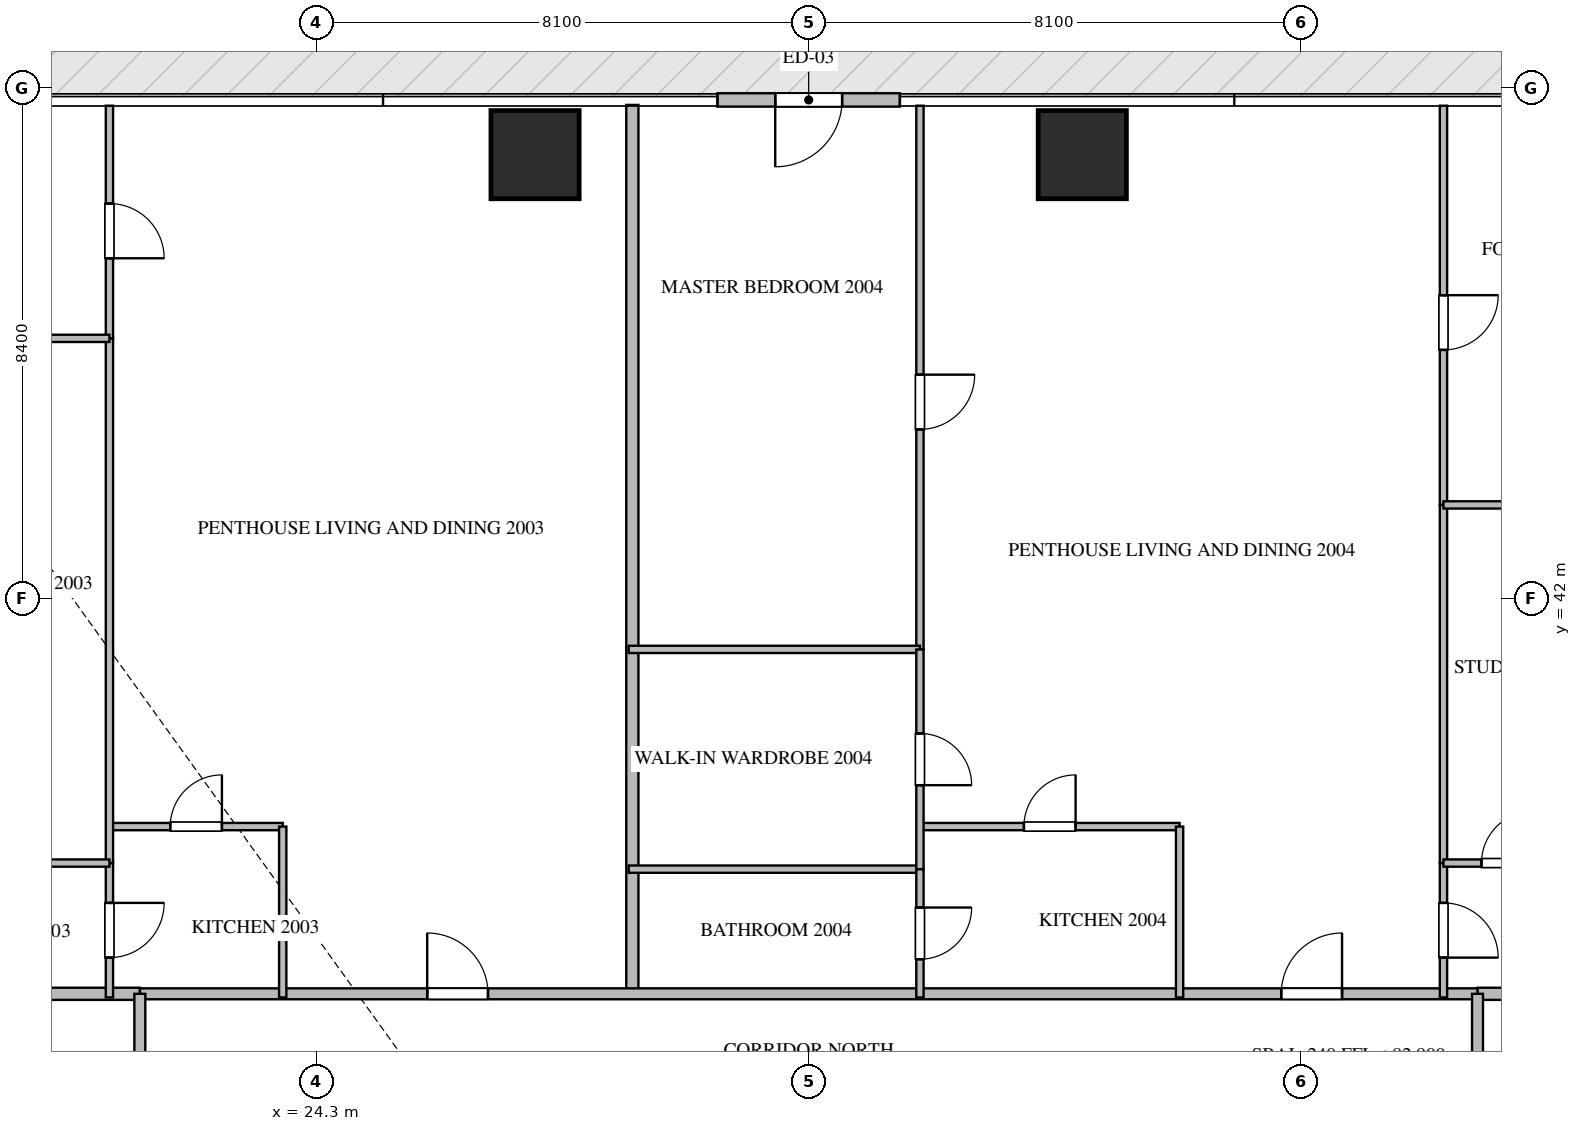
"""IFC4 building model, lengths in metres.
Left out: names, types, materials, properties, quantities, classifications, styles, units other than length and angle.
Written with IfcOpenShell. Run it as: python <this file> out.ifc"""

import sys

from ifc_helpers import new_model, si_unit, direction, frame, frame_2d, origin, origin_2d, place, context, subcontext, project, spatial, rectangle, extrude, source, transform, mapped, element, fill, save


model = new_model("IFC4")
c1 = context("Model", 3, precision=1e-05, world=origin(), true_north=direction((0.0, 1.0)))
c2 = subcontext(c1, "Body", "Model", "MODEL_VIEW")
j1 = project(units=[si_unit("LENGTHUNIT", "METRE"), si_unit("PLANEANGLEUNIT", "RADIAN")], contexts=[c1])
p1 = place(None, origin())
s1 = spatial("IfcSite", under=j1, at=p1, CompositionType="ELEMENT")
p2 = place(p1, origin())
s2 = spatial("IfcBuilding", under=s1, at=p2, CompositionType="ELEMENT")
p3 = place(p2, frame((0.0, 0.0, 82.95)))
s3 = spatial("IfcBuildingStorey", under=s2, at=p3, CompositionType="ELEMENT", Elevation=82.95)
m1 = source(origin(), c2, "Body", "SweptSolid", [
    extrude(rectangle(XDim=1.45, YDim=1.45, at=origin_2d()), origin(), (0.0, 0.0, 1.0), 3.75),
])
for number, where, z_axis, x_axis in (
    (1, (27.9, 49.3, -0.26), (0.0, 0.0, 1.0), (1.0, 0.0, 0.0)),
    (2, (36.9, 49.3, -0.26), (0.0, 0.0, 1.0), (1.0, 0.0, 0.0)),
):
    element("IfcColumn", number, at=place(p3, frame(where, z_axis=z_axis, x_axis=x_axis)), inside=s3, PredefinedType="COLUMN", context=c2, shape_type="MappedRepresentation", body=[
        mapped(m1, transform((0.0, 0.0, 0.0), scale=1.0)),
    ])
p4 = place(p3, frame((33.9, 50.2, 0.0), z_axis=(0.0, 0.0, 1.0), x_axis=(-1.0, 0.0, 0.0)))
e3 = element("IfcWall", 3, at=p4, inside=s3, PredefinedType="ELEMENTEDWALL", context=c2, shape_type="SweptSolid", body=[
    extrude(rectangle(XDim=3.0, YDim=0.22, at=frame_2d((1.5, 0.0))), origin(), (0.0, 0.0, 1.0), 3.475),
])
p5 = place(p4, frame((0.95, 0.0, 0.0)))
e4 = element("IfcOpeningElement", 4, at=p5, cuts=e3, PredefinedType="OPENING", context=c2, shape_type="SweptSolid", body=[
    extrude(rectangle(XDim=1.1, YDim=2.2, at=frame_2d((0.55, 1.1))), frame((0.0, 0.12, 0.0), z_axis=(0.0, -1.0, 0.0), x_axis=(1.0, 0.0, 0.0)), (0.0, 0.0, 1.0), 0.24),
])
p6 = place(p3, frame((29.5, 35.5, 0.0), z_axis=(0.0, 0.0, 1.0), x_axis=(0.0, 1.0, 0.0)))
e5 = element("IfcWall", 5, at=p6, inside=s3, PredefinedType="PARTITIONING", context=c2, shape_type="SweptSolid", body=[
    extrude(rectangle(XDim=14.618, YDim=0.2, at=frame_2d((7.309, 0.0))), origin(), (0.0, 0.0, 1.0), 3.49),
])
p7 = place(p3, frame((6.082, 35.5, 0.0), z_axis=(0.0, 0.0, 1.0), x_axis=(1.0, 0.0, 0.0)))
e6 = element("IfcWall", 6, at=p7, inside=s3, PredefinedType="PARTITIONING", context=c2, shape_type="SweptSolid", body=[
    extrude(rectangle(XDim=15.318, YDim=0.2, at=frame_2d((7.659, 0.0))), origin(), (0.0, 0.0, 1.0), 3.49),
])
p8 = place(p3, frame((43.4, 35.5, 0.0), z_axis=(0.0, 0.0, 1.0), x_axis=(1.0, 0.0, 0.0)))
e7 = element("IfcWall", 7, at=p8, inside=s3, PredefinedType="PARTITIONING", context=c2, shape_type="SweptSolid", body=[
    extrude(rectangle(XDim=15.318, YDim=0.2, at=frame_2d((7.659, 0.0))), origin(), (0.0, 0.0, 1.0), 3.49),
])
p9 = place(p3, frame((21.402, 35.5, 0.0), z_axis=(0.0, 0.0, 1.0), x_axis=(1.0, 0.0, 0.0)))
e8 = element("IfcWall", 8, at=p9, inside=s3, PredefinedType="PARTITIONING", context=c2, shape_type="SweptSolid", body=[
    extrude(rectangle(XDim=21.996, YDim=0.18, at=frame_2d((10.998, 0.0))), origin(), (0.0, 0.0, 1.0), 3.49),
])
p10 = place(p9, frame((4.724, 0.0, 0.0)))
e9 = element("IfcOpeningElement", 9, at=p10, cuts=e8, PredefinedType="OPENING", context=c2, shape_type="SweptSolid", body=[
    extrude(rectangle(XDim=1.0, YDim=2.15, at=frame_2d((0.5, 1.075))), frame((0.0, 0.1, 0.0), z_axis=(0.0, -1.0, 0.0), x_axis=(1.0, 0.0, 0.0)), (0.0, 0.0, 1.0), 0.2),
])
p11 = place(p9, frame((18.77, 0.0, 0.0)))
e10 = element("IfcOpeningElement", 10, at=p11, cuts=e8, PredefinedType="OPENING", context=c2, shape_type="SweptSolid", body=[
    extrude(rectangle(XDim=1.0, YDim=2.15, at=frame_2d((0.5, 1.075))), frame((0.0, 0.1, 0.0), z_axis=(0.0, -1.0, 0.0), x_axis=(1.0, 0.0, 0.0)), (0.0, 0.0, 1.0), 0.2),
])
p12 = place(p3, frame((21.4, 14.9, 0.0), z_axis=(0.0, 0.0, 1.0), x_axis=(0.0, 1.0, 0.0)))
e11 = element("IfcWall", 11, at=p12, inside=s3, PredefinedType="PARTITIONING", context=c2, shape_type="SweptSolid", body=[
    extrude(rectangle(XDim=20.6, YDim=0.18, at=frame_2d((10.3, 0.0))), origin(), (0.0, 0.0, 1.0), 3.49),
])
p13 = place(p12, frame((1.96, 0.0, 0.0)))
e12 = element("IfcOpeningElement", 12, at=p13, cuts=e11, PredefinedType="OPENING", context=c2, shape_type="SweptSolid", body=[
    extrude(rectangle(XDim=1.0, YDim=2.15, at=frame_2d((0.5, 1.075))), frame((0.0, 0.1, 0.0), z_axis=(0.0, -1.0, 0.0), x_axis=(1.0, 0.0, 0.0)), (0.0, 0.0, 1.0), 0.2),
])
p14 = place(p3, frame((43.4, 14.9, 0.0), z_axis=(0.0, 0.0, 1.0), x_axis=(0.0, 1.0, 0.0)))
e13 = element("IfcWall", 13, at=p14, inside=s3, PredefinedType="PARTITIONING", context=c2, shape_type="SweptSolid", body=[
    extrude(rectangle(XDim=20.6, YDim=0.18, at=frame_2d((10.3, 0.0))), origin(), (0.0, 0.0, 1.0), 3.49),
])
p15 = place(p14, frame((1.82, 0.0, 0.0)))
e14 = element("IfcOpeningElement", 14, at=p15, cuts=e13, PredefinedType="OPENING", context=c2, shape_type="SweptSolid", body=[
    extrude(rectangle(XDim=1.0, YDim=2.15, at=frame_2d((0.5, 1.075))), frame((0.0, 0.1, 0.0), z_axis=(0.0, -1.0, 0.0), x_axis=(1.0, 0.0, 0.0)), (0.0, 0.0, 1.0), 0.2),
])
p16 = place(p14, frame((11.368, 0.0, 0.0)))
e15 = element("IfcOpeningElement", 15, at=p16, cuts=e13, PredefinedType="OPENING", context=c2, shape_type="SweptSolid", body=[
    extrude(rectangle(XDim=1.0, YDim=2.15, at=frame_2d((0.5, 1.075))), frame((0.0, 0.1, 0.0), z_axis=(0.0, -1.0, 0.0), x_axis=(1.0, 0.0, 0.0)), (0.0, 0.0, 1.0), 0.2),
])
p17 = place(p14, frame((18.06, 0.0, 0.0)))
e16 = element("IfcOpeningElement", 16, at=p17, cuts=e13, PredefinedType="OPENING", context=c2, shape_type="SweptSolid", body=[
    extrude(rectangle(XDim=1.0, YDim=2.15, at=frame_2d((0.5, 1.075))), frame((0.0, 0.1, 0.0), z_axis=(0.0, -1.0, 0.0), x_axis=(1.0, 0.0, 0.0)), (0.0, 0.0, 1.0), 0.2),
])
p18 = place(p3, frame((20.9, 38.25, 0.0), z_axis=(0.0, 0.0, 1.0), x_axis=(1.0, 0.0, 0.0)))
e17 = element("IfcWall", 17, at=p18, inside=s3, PredefinedType="PARTITIONING", context=c2, shape_type="SweptSolid", body=[
    extrude(rectangle(XDim=2.85, YDim=0.12, at=frame_2d((1.425, 0.0))), origin(), (0.0, 0.0, 1.0), 3.49),
])
p19 = place(p18, frame((1.0, 0.0, 0.0)))
e18 = element("IfcOpeningElement", 18, at=p19, cuts=e17, PredefinedType="OPENING", context=c2, shape_type="SweptSolid", body=[
    extrude(rectangle(XDim=0.85, YDim=2.1, at=frame_2d((0.425, 1.05))), frame((0.0, 0.07, 0.0), z_axis=(0.0, -1.0, 0.0), x_axis=(1.0, 0.0, 0.0)), (0.0, 0.0, 1.0), 0.14),
])
p20 = place(p3, frame((23.75, 38.25, 0.0), z_axis=(0.0, 0.0, 1.0), x_axis=(0.0, -1.0, 0.0)))
e19 = element("IfcWall", 19, at=p20, inside=s3, PredefinedType="PARTITIONING", context=c2, shape_type="SweptSolid", body=[
    extrude(rectangle(XDim=2.81, YDim=0.12, at=frame_2d((1.405, 0.0))), origin(), (0.0, 0.0, 1.0), 3.49),
])
p21 = place(p3, frame((20.9, 37.65, 0.0), z_axis=(0.0, 0.0, 1.0), x_axis=(0.0, -1.0, 0.0)))
e20 = element("IfcWall", 20, at=p21, inside=s3, PredefinedType="PARTITIONING", context=c2, shape_type="SweptSolid", body=[
    extrude(rectangle(XDim=2.21, YDim=0.12, at=frame_2d((1.105, 0.0))), origin(), (0.0, 0.0, 1.0), 3.49),
])
p22 = place(p21, frame((0.655, 0.0, 0.0)))
e21 = element("IfcOpeningElement", 21, at=p22, cuts=e20, PredefinedType="OPENING", context=c2, shape_type="SweptSolid", body=[
    extrude(rectangle(XDim=0.9, YDim=2.1, at=frame_2d((0.45, 1.05))), frame((0.0, 0.07, 0.0), z_axis=(0.0, -1.0, 0.0), x_axis=(1.0, 0.0, 0.0)), (0.0, 0.0, 1.0), 0.14),
])
p23 = place(p3, frame((20.9, 50.105, 0.0), z_axis=(0.0, 0.0, 1.0), x_axis=(0.0, -1.0, 0.0)))
e22 = element("IfcWall", 22, at=p23, inside=s3, PredefinedType="PARTITIONING", context=c2, shape_type="SweptSolid", body=[
    extrude(rectangle(XDim=3.826, YDim=0.12, at=frame_2d((1.913, 0.0))), origin(), (0.0, 0.0, 1.0), 3.49),
])
p24 = place(p23, frame((1.609, 0.0, 0.0)))
e23 = element("IfcOpeningElement", 23, at=p24, cuts=e22, PredefinedType="OPENING", context=c2, shape_type="SweptSolid", body=[
    extrude(rectangle(XDim=0.9, YDim=2.1, at=frame_2d((0.45, 1.05))), frame((0.0, 0.07, 0.0), z_axis=(0.0, -1.0, 0.0), x_axis=(1.0, 0.0, 0.0)), (0.0, 0.0, 1.0), 0.14),
])
p25 = place(p3, frame((20.9, 46.277, 0.0), z_axis=(0.0, 0.0, 1.0), x_axis=(0.0, -1.0, 0.0)))
e24 = element("IfcWall", 24, at=p25, inside=s3, PredefinedType="PARTITIONING", context=c2, shape_type="SweptSolid", body=[
    extrude(rectangle(XDim=8.625, YDim=0.12, at=frame_2d((4.312, 0.0))), origin(), (0.0, 0.0, 1.0), 3.49),
])
p26 = place(p3, frame((15.75, 46.279, 0.0), z_axis=(0.0, 0.0, 1.0), x_axis=(1.0, 0.0, 0.0)))
e25 = element("IfcWall", 25, at=p26, inside=s3, PredefinedType="PARTITIONING", context=c2, shape_type="SweptSolid", body=[
    extrude(rectangle(XDim=5.15, YDim=0.12, at=frame_2d((2.575, 0.0))), origin(), (0.0, 0.0, 1.0), 3.49),
])
p27 = place(p3, frame((17.852, 37.65, 0.0), z_axis=(0.0, 0.0, 1.0), x_axis=(1.0, 0.0, 0.0)))
e26 = element("IfcWall", 26, at=p27, inside=s3, PredefinedType="PARTITIONING", context=c2, shape_type="SweptSolid", body=[
    extrude(rectangle(XDim=3.048, YDim=0.12, at=frame_2d((1.524, 0.0))), origin(), (0.0, 0.0, 1.0), 3.49),
])
p28 = place(p27, frame((1.099, 0.0, 0.0)))
e27 = element("IfcOpeningElement", 27, at=p28, cuts=e26, PredefinedType="OPENING", context=c2, shape_type="SweptSolid", body=[
    extrude(rectangle(XDim=0.85, YDim=2.1, at=frame_2d((0.425, 1.05))), frame((0.0, 0.07, 0.0), z_axis=(0.0, -1.0, 0.0), x_axis=(1.0, 0.0, 0.0)), (0.0, 0.0, 1.0), 0.14),
])
p29 = place(p3, frame((34.23, 38.25, 0.0), z_axis=(0.0, 0.0, 1.0), x_axis=(1.0, 0.0, 0.0)))
e28 = element("IfcWall", 28, at=p29, inside=s3, PredefinedType="PARTITIONING", context=c2, shape_type="SweptSolid", body=[
    extrude(rectangle(XDim=4.27, YDim=0.12, at=frame_2d((2.135, 0.0))), origin(), (0.0, 0.0, 1.0), 3.49),
])
p30 = place(p29, frame((1.71, 0.0, 0.0)))
e29 = element("IfcOpeningElement", 29, at=p30, cuts=e28, PredefinedType="OPENING", context=c2, shape_type="SweptSolid", body=[
    extrude(rectangle(XDim=0.85, YDim=2.1, at=frame_2d((0.425, 1.05))), frame((0.0, 0.07, 0.0), z_axis=(0.0, -1.0, 0.0), x_axis=(1.0, 0.0, 0.0)), (0.0, 0.0, 1.0), 0.14),
])
p31 = place(p3, frame((38.5, 38.25, 0.0), z_axis=(0.0, 0.0, 1.0), x_axis=(0.0, -1.0, 0.0)))
e30 = element("IfcWall", 30, at=p31, inside=s3, PredefinedType="PARTITIONING", context=c2, shape_type="SweptSolid", body=[
    extrude(rectangle(XDim=2.81, YDim=0.12, at=frame_2d((1.405, 0.0))), origin(), (0.0, 0.0, 1.0), 3.49),
])
p32 = place(p3, frame((34.23, 50.105, 0.0), z_axis=(0.0, 0.0, 1.0), x_axis=(0.0, -1.0, 0.0)))
e31 = element("IfcWall", 31, at=p32, inside=s3, PredefinedType="PARTITIONING", context=c2, shape_type="SweptSolid", body=[
    extrude(rectangle(XDim=8.941, YDim=0.12, at=frame_2d((4.47, 0.0))), origin(), (0.0, 0.0, 1.0), 3.49),
])
p33 = place(p32, frame((4.423, 0.0, 0.0)))
e32 = element("IfcOpeningElement", 32, at=p33, cuts=e31, PredefinedType="OPENING", context=c2, shape_type="SweptSolid", body=[
    extrude(rectangle(XDim=0.9, YDim=2.1, at=frame_2d((0.45, 1.05))), frame((0.0, 0.07, 0.0), z_axis=(0.0, -1.0, 0.0), x_axis=(1.0, 0.0, 0.0)), (0.0, 0.0, 1.0), 0.14),
])
for number, where, z_axis, x_axis in (
    (33, (29.44, 41.164, 0.0), (0.0, 0.0, 1.0), (1.0, 0.0, 0.0)),
    (34, (29.44, 37.55, 0.0), (0.0, 0.0, 1.0), (1.0, 0.0, 0.0)),
):
    element("IfcWall", number, at=place(p3, frame(where, z_axis=z_axis, x_axis=x_axis)), inside=s3, PredefinedType="PARTITIONING", context=c2, shape_type="SweptSolid", body=[
        extrude(rectangle(XDim=4.79, YDim=0.12, at=frame_2d((2.395, 0.0))), origin(), (0.0, 0.0, 1.0), 3.49),
    ])
p34 = place(p3, frame((34.23, 41.162, 0.0), z_axis=(0.0, 0.0, 1.0), x_axis=(0.0, -1.0, 0.0)))
e35 = element("IfcWall", 35, at=p34, inside=s3, PredefinedType="PARTITIONING", context=c2, shape_type="SweptSolid", body=[
    extrude(rectangle(XDim=3.612, YDim=0.12, at=frame_2d((1.806, 0.0))), origin(), (0.0, 0.0, 1.0), 3.49),
])
p35 = place(p34, frame((1.381, 0.0, 0.0)))
e36 = element("IfcOpeningElement", 36, at=p35, cuts=e35, PredefinedType="OPENING", context=c2, shape_type="SweptSolid", body=[
    extrude(rectangle(XDim=0.85, YDim=2.1, at=frame_2d((0.425, 1.05))), frame((0.0, 0.07, 0.0), z_axis=(0.0, -1.0, 0.0), x_axis=(1.0, 0.0, 0.0)), (0.0, 0.0, 1.0), 0.14),
])
p36 = place(p3, frame((34.23, 37.548, 0.0), z_axis=(0.0, 0.0, 1.0), x_axis=(0.0, -1.0, 0.0)))
e37 = element("IfcWall", 37, at=p36, inside=s3, PredefinedType="PARTITIONING", context=c2, shape_type="SweptSolid", body=[
    extrude(rectangle(XDim=2.108, YDim=0.12, at=frame_2d((1.054, 0.0))), origin(), (0.0, 0.0, 1.0), 3.49),
])
p37 = place(p36, frame((0.629, 0.0, 0.0)))
e38 = element("IfcOpeningElement", 38, at=p37, cuts=e37, PredefinedType="OPENING", context=c2, shape_type="SweptSolid", body=[
    extrude(rectangle(XDim=0.85, YDim=2.1, at=frame_2d((0.425, 1.05))), frame((0.0, 0.07, 0.0), z_axis=(0.0, -1.0, 0.0), x_axis=(1.0, 0.0, 0.0)), (0.0, 0.0, 1.0), 0.14),
])
p38 = place(p3, frame((42.84, 37.65, 0.0), z_axis=(0.0, 0.0, 1.0), x_axis=(0.0, -1.0, 0.0)))
e39 = element("IfcWall", 39, at=p38, inside=s3, PredefinedType="PARTITIONING", context=c2, shape_type="SweptSolid", body=[
    extrude(rectangle(XDim=2.21, YDim=0.12, at=frame_2d((1.105, 0.0))), origin(), (0.0, 0.0, 1.0), 3.49),
])
p39 = place(p38, frame((0.655, 0.0, 0.0)))
e40 = element("IfcOpeningElement", 40, at=p39, cuts=e39, PredefinedType="OPENING", context=c2, shape_type="SweptSolid", body=[
    extrude(rectangle(XDim=0.9, YDim=2.1, at=frame_2d((0.45, 1.05))), frame((0.0, 0.07, 0.0), z_axis=(0.0, -1.0, 0.0), x_axis=(1.0, 0.0, 0.0)), (0.0, 0.0, 1.0), 0.14),
])
p40 = place(p3, frame((42.84, 50.105, 0.0), z_axis=(0.0, 0.0, 1.0), x_axis=(0.0, -1.0, 0.0)))
e41 = element("IfcWall", 41, at=p40, inside=s3, PredefinedType="PARTITIONING", context=c2, shape_type="SweptSolid", body=[
    extrude(rectangle(XDim=6.565, YDim=0.12, at=frame_2d((3.282, 0.0))), origin(), (0.0, 0.0, 1.0), 3.49),
])
p41 = place(p40, frame((3.116, 0.0, 0.0)))
e42 = element("IfcOpeningElement", 42, at=p41, cuts=e41, PredefinedType="OPENING", context=c2, shape_type="SweptSolid", body=[
    extrude(rectangle(XDim=0.9, YDim=2.1, at=frame_2d((0.45, 1.05))), frame((0.0, 0.07, 0.0), z_axis=(0.0, -1.0, 0.0), x_axis=(1.0, 0.0, 0.0)), (0.0, 0.0, 1.0), 0.14),
])
p42 = place(p3, frame((42.84, 43.538, 0.0), z_axis=(0.0, 0.0, 1.0), x_axis=(0.0, -1.0, 0.0)))
e43 = element("IfcWall", 43, at=p42, inside=s3, PredefinedType="PARTITIONING", context=c2, shape_type="SweptSolid", body=[
    extrude(rectangle(XDim=5.886, YDim=0.12, at=frame_2d((2.943, 0.0))), origin(), (0.0, 0.0, 1.0), 3.49),
])
p43 = place(p3, frame((42.84, 43.54, 0.0), z_axis=(0.0, 0.0, 1.0), x_axis=(1.0, 0.0, 0.0)))
e44 = element("IfcWall", 44, at=p43, inside=s3, PredefinedType="PARTITIONING", context=c2, shape_type="SweptSolid", body=[
    extrude(rectangle(XDim=5.15, YDim=0.12, at=frame_2d((2.575, 0.0))), origin(), (0.0, 0.0, 1.0), 3.49),
])
p44 = place(p3, frame((42.84, 37.65, 0.0), z_axis=(0.0, 0.0, 1.0), x_axis=(1.0, 0.0, 0.0)))
e45 = element("IfcWall", 45, at=p44, inside=s3, PredefinedType="PARTITIONING", context=c2, shape_type="SweptSolid", body=[
    extrude(rectangle(XDim=2.1, YDim=0.12, at=frame_2d((1.05, 0.0))), origin(), (0.0, 0.0, 1.0), 3.49),
])
p45 = place(p44, frame((0.625, 0.0, 0.0)))
e46 = element("IfcOpeningElement", 46, at=p45, cuts=e45, PredefinedType="OPENING", context=c2, shape_type="SweptSolid", body=[
    extrude(rectangle(XDim=0.85, YDim=2.1, at=frame_2d((0.425, 1.05))), frame((0.0, 0.07, 0.0), z_axis=(0.0, -1.0, 0.0), x_axis=(1.0, 0.0, 0.0)), (0.0, 0.0, 1.0), 0.14),
])
m2 = source(origin(), c2, "Body", "SweptSolid", [
    extrude(rectangle(XDim=1.1, YDim=2.2, at=frame_2d((0.55, 1.1))), frame((0.0, 0.025, 0.0), z_axis=(0.0, -1.0, 0.0), x_axis=(1.0, 0.0, 0.0)), (0.0, 0.0, 1.0), 0.05),
])
p46 = place(p5, origin())
e47 = element("IfcDoor", 47, at=p46, inside=s3, OperationType="SINGLE_SWING_RIGHT", PredefinedType="DOOR", context=c2, shape_type="MappedRepresentation", body=[
    mapped(m2, transform((0.0, 0.0, 0.0), scale=1.0)),
])
fill(e4, e47)
m3 = source(origin(), c2, "Body", "SweptSolid", [
    extrude(rectangle(XDim=1.0, YDim=2.15, at=frame_2d((0.5, 1.075))), frame((0.0, 0.025, 0.0), z_axis=(0.0, -1.0, 0.0), x_axis=(1.0, 0.0, 0.0)), (0.0, 0.0, 1.0), 0.05),
])
p47 = place(p10, origin())
e48 = element("IfcDoor", 48, at=p47, inside=s3, OperationType="SINGLE_SWING_LEFT", PredefinedType="DOOR", context=c2, shape_type="MappedRepresentation", body=[
    mapped(m3, transform((0.0, 0.0, 0.0), scale=1.0)),
])
fill(e9, e48)
p48 = place(p11, origin())
e49 = element("IfcDoor", 49, at=p48, inside=s3, OperationType="SINGLE_SWING_RIGHT", PredefinedType="DOOR", context=c2, shape_type="MappedRepresentation", body=[
    mapped(m3, transform((0.0, 0.0, 0.0), scale=1.0)),
])
fill(e10, e49)
m4 = source(origin(), c2, "Body", "SweptSolid", [
    extrude(rectangle(XDim=0.85, YDim=2.1, at=frame_2d((0.425, 1.05))), frame((0.0, 0.025, 0.0), z_axis=(0.0, -1.0, 0.0), x_axis=(1.0, 0.0, 0.0)), (0.0, 0.0, 1.0), 0.05),
])
p49 = place(p19, origin())
e50 = element("IfcDoor", 50, at=p49, inside=s3, OperationType="SINGLE_SWING_RIGHT", PredefinedType="DOOR", context=c2, shape_type="MappedRepresentation", body=[
    mapped(m4, transform((0.0, 0.0, 0.0), scale=1.0)),
])
fill(e18, e50)
m5 = source(origin(), c2, "Body", "SweptSolid", [
    extrude(rectangle(XDim=0.9, YDim=2.1, at=frame_2d((0.45, 1.05))), frame((0.0, 0.025, 0.0), z_axis=(0.0, -1.0, 0.0), x_axis=(1.0, 0.0, 0.0)), (0.0, 0.0, 1.0), 0.05),
])
p50 = place(p22, origin())
e51 = element("IfcDoor", 51, at=p50, inside=s3, OperationType="SINGLE_SWING_LEFT", PredefinedType="DOOR", context=c2, shape_type="MappedRepresentation", body=[
    mapped(m5, transform((0.0, 0.0, 0.0), scale=1.0)),
])
fill(e21, e51)
p51 = place(p24, origin())
e52 = element("IfcDoor", 52, at=p51, inside=s3, OperationType="SINGLE_SWING_RIGHT", PredefinedType="DOOR", context=c2, shape_type="MappedRepresentation", body=[
    mapped(m5, transform((0.0, 0.0, 0.0), scale=1.0)),
])
fill(e23, e52)
p52 = place(p30, origin())
e53 = element("IfcDoor", 53, at=p52, inside=s3, OperationType="SINGLE_SWING_RIGHT", PredefinedType="DOOR", context=c2, shape_type="MappedRepresentation", body=[
    mapped(m4, transform((0.0, 0.0, 0.0), scale=1.0)),
])
fill(e29, e53)
p53 = place(p33, origin())
e54 = element("IfcDoor", 54, at=p53, inside=s3, OperationType="SINGLE_SWING_LEFT", PredefinedType="DOOR", context=c2, shape_type="MappedRepresentation", body=[
    mapped(m5, transform((0.0, 0.0, 0.0), scale=1.0)),
])
fill(e32, e54)
p54 = place(p35, origin())
e55 = element("IfcDoor", 55, at=p54, inside=s3, OperationType="SINGLE_SWING_RIGHT", PredefinedType="DOOR", context=c2, shape_type="MappedRepresentation", body=[
    mapped(m4, transform((0.0, 0.0, 0.0), scale=1.0)),
])
fill(e36, e55)
p55 = place(p37, origin())
e56 = element("IfcDoor", 56, at=p55, inside=s3, OperationType="SINGLE_SWING_LEFT", PredefinedType="DOOR", context=c2, shape_type="MappedRepresentation", body=[
    mapped(m4, transform((0.0, 0.0, 0.0), scale=1.0)),
])
fill(e38, e56)
p56 = place(p39, origin())
e57 = element("IfcDoor", 57, at=p56, inside=s3, OperationType="SINGLE_SWING_RIGHT", PredefinedType="DOOR", context=c2, shape_type="MappedRepresentation", body=[
    mapped(m5, transform((0.0, 0.0, 0.0), scale=1.0)),
])
fill(e40, e57)
p57 = place(p41, origin())
e58 = element("IfcDoor", 58, at=p57, inside=s3, OperationType="SINGLE_SWING_LEFT", PredefinedType="DOOR", context=c2, shape_type="MappedRepresentation", body=[
    mapped(m5, transform((0.0, 0.0, 0.0), scale=1.0)),
])
fill(e42, e58)
p58 = place(p45, origin())
e59 = element("IfcDoor", 59, at=p58, inside=s3, OperationType="SINGLE_SWING_RIGHT", PredefinedType="DOOR", context=c2, shape_type="MappedRepresentation", body=[
    mapped(m4, transform((0.0, 0.0, 0.0), scale=1.0)),
])
fill(e46, e59)
save(model, sys.argv[1])
